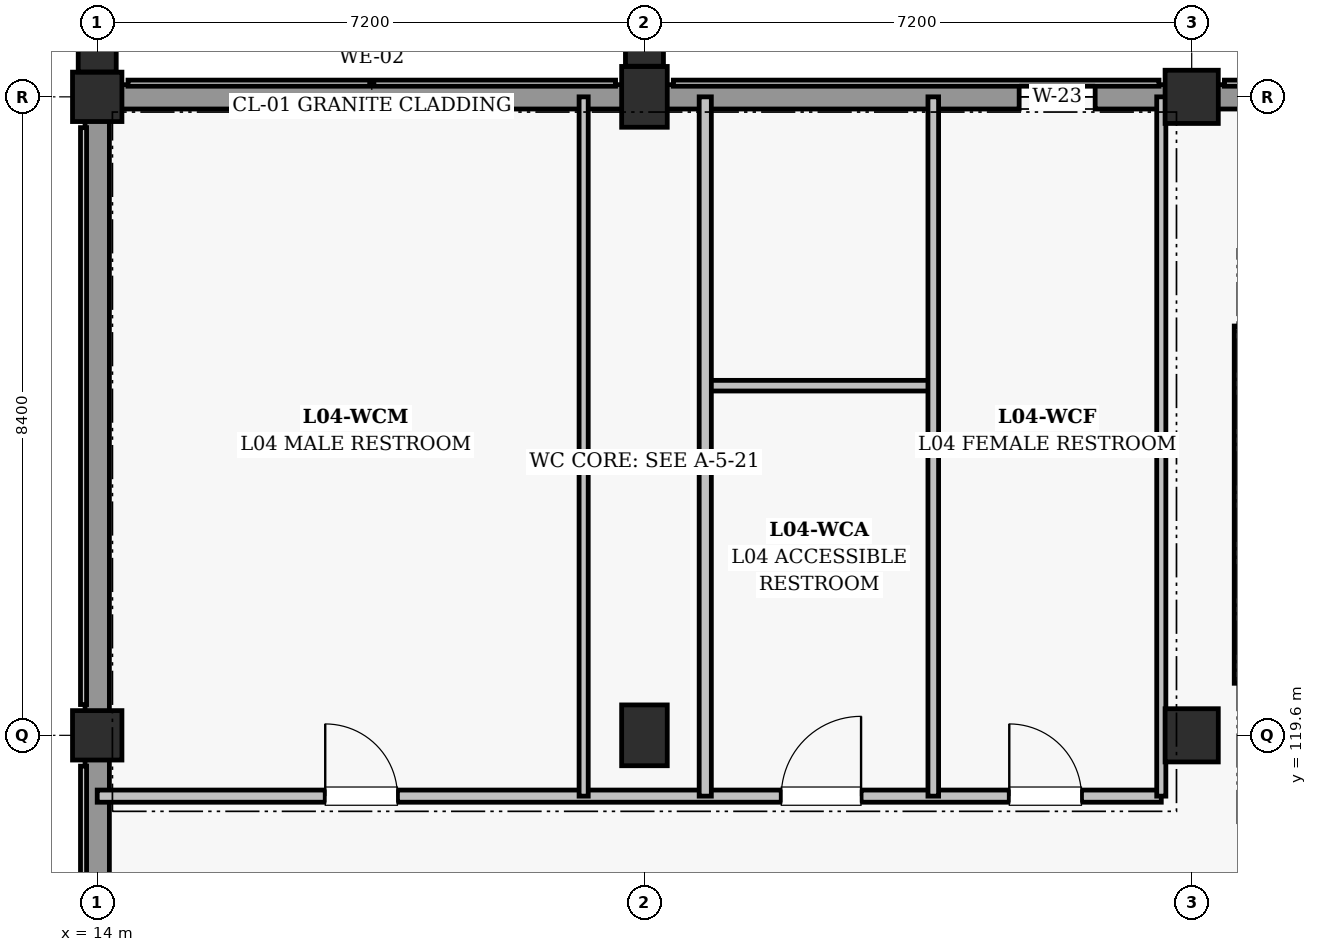
"""IFC4 building model, lengths in metres.
Left out: names, types, materials, properties, quantities, classifications, styles, units other than length and angle.
Written with IfcOpenShell. Run it as: python <this file> out.ifc"""

import sys

from ifc_helpers import new_model, si_unit, direction, frame, frame_2d, origin, origin_2d, place, context, subcontext, project, spatial, rectangle, extrude, element, fill, save


model = new_model("IFC4")
c1 = context("Model", 3, precision=1e-05, world=origin(), true_north=direction((0.0, 1.0)))
c2 = subcontext(c1, "Body", "Model", "MODEL_VIEW")
j1 = project(units=[si_unit("LENGTHUNIT", "METRE"), si_unit("PLANEANGLEUNIT", "RADIAN")], contexts=[c1])
p1 = place(None, origin())
s1 = spatial("IfcSite", under=j1, at=p1, CompositionType="ELEMENT")
p2 = place(p1, origin())
s2 = spatial("IfcBuilding", under=s1, at=p2, CompositionType="ELEMENT")
p3 = place(p2, frame((0.0, 0.0, 18.9)))
s3 = spatial("IfcBuildingStorey", under=s2, at=p3, CompositionType="ELEMENT", Elevation=18.9)
for number, where, z_axis, x_axis in (
    (1, (14.0, 119.6, 0.0), (0.0, 0.0, 1.0), (1.0, 0.0, 0.0)),
    (2, (14.0, 128.0, 0.0), (0.0, 0.0, 1.0), (1.0, 0.0, 0.0)),
):
    element("IfcColumn", number, at=place(p3, frame(where, z_axis=z_axis, x_axis=x_axis)), inside=s3, PredefinedType="COLUMN", context=c2, shape_type="SweptSolid", body=[
        extrude(rectangle(XDim=0.65, YDim=0.65, at=origin_2d()), origin(), (0.0, 0.0, 1.0), 4.5),
    ])
for number, where, z_axis, x_axis in (
    (3, (21.2, 119.6, 0.0), (0.0, 0.0, 1.0), (1.0, 0.0, 0.0)),
    (4, (21.2, 128.0, 0.0), (0.0, 0.0, 1.0), (1.0, 0.0, 0.0)),
):
    element("IfcColumn", number, at=place(p3, frame(where, z_axis=z_axis, x_axis=x_axis)), inside=s3, PredefinedType="COLUMN", context=c2, shape_type="SweptSolid", body=[
        extrude(rectangle(XDim=0.6, YDim=0.8, at=origin_2d()), origin(), (0.0, 0.0, 1.0), 4.5),
    ])
for number, where, z_axis, x_axis in (
    (5, (28.4, 119.6, 0.0), (0.0, 0.0, 1.0), (1.0, 0.0, 0.0)),
    (6, (28.4, 128.0, 0.0), (0.0, 0.0, 1.0), (1.0, 0.0, 0.0)),
):
    element("IfcColumn", number, at=place(p3, frame(where, z_axis=z_axis, x_axis=x_axis)), inside=s3, PredefinedType="COLUMN", context=c2, shape_type="SweptSolid", body=[
        extrude(rectangle(XDim=0.7, YDim=0.7, at=origin_2d()), origin(), (0.0, 0.0, 1.0), 4.5),
    ])
for number, where, z_axis, x_axis in (
    (7, (14.0, 128.703, 0.0), (0.0, 0.0, 1.0), (1.0, 0.0, 0.0)),
    (8, (21.2, 128.778, 0.0), (0.0, 0.0, 1.0), (1.0, 0.0, 0.0)),
):
    element("IfcColumn", number, at=place(p3, frame(where, z_axis=z_axis, x_axis=x_axis)), inside=s3, PredefinedType="PILASTER", context=c2, shape_type="SweptSolid", body=[
        extrude(rectangle(XDim=0.5, YDim=0.75, at=origin_2d()), origin(), (0.0, 0.0, 1.0), 4.5),
    ])
p4 = place(p3, frame((14.305, 128.0, 0.0), z_axis=(0.0, 0.0, 1.0), x_axis=(1.0, 0.0, 0.0)))
e9 = element("IfcWall", 9, at=p4, inside=s3, PredefinedType="SOLIDWALL", context=c2, shape_type="SweptSolid", body=[
    extrude(rectangle(XDim=6.615, YDim=0.32, at=frame_2d((3.308, 0.0))), origin(), (0.0, 0.0, 1.0), 3.305),
])
p5 = place(p3, frame((21.48, 128.0, 0.0), z_axis=(0.0, 0.0, 1.0), x_axis=(1.0, 0.0, 0.0)))
e10 = element("IfcWall", 10, at=p5, inside=s3, PredefinedType="SOLIDWALL", context=c2, shape_type="SweptSolid", body=[
    extrude(rectangle(XDim=6.59, YDim=0.32, at=frame_2d((3.295, 0.0))), origin(), (0.0, 0.0, 1.0), 3.305),
])
p6 = place(p5, frame((4.65, 0.0, 1.85)))
e11 = element("IfcOpeningElement", 11, at=p6, cuts=e10, PredefinedType="OPENING", context=c2, shape_type="SweptSolid", body=[
    extrude(rectangle(XDim=1.0, YDim=0.95, at=frame_2d((0.5, 0.475))), frame((0.0, 0.17, 0.0), z_axis=(0.0, -1.0, 0.0), x_axis=(1.0, 0.0, 0.0)), (0.0, 0.0, 1.0), 0.34),
])
p7 = place(p3, frame((28.73, 128.0, 0.0), z_axis=(0.0, 0.0, 1.0), x_axis=(1.0, 0.0, 0.0)))
e12 = element("IfcWall", 12, at=p7, inside=s3, PredefinedType="SOLIDWALL", context=c2, shape_type="SweptSolid", body=[
    extrude(rectangle(XDim=6.565, YDim=0.32, at=frame_2d((3.282, 0.0))), origin(), (0.0, 0.0, 1.0), 3.355),
])
p8 = place(p3, frame((14.0, 111.58, 0.0), z_axis=(0.0, 0.0, 1.0), x_axis=(0.0, 1.0, 0.0)))
e13 = element("IfcWall", 13, at=p8, inside=s3, PredefinedType="SOLIDWALL", context=c2, shape_type="SweptSolid", body=[
    extrude(rectangle(XDim=7.715, YDim=0.32, at=frame_2d((3.857, 0.0))), origin(), (0.0, 0.0, 1.0), 3.405),
])
p9 = place(p3, frame((14.0, 119.905, 0.0), z_axis=(0.0, 0.0, 1.0), x_axis=(0.0, 1.0, 0.0)))
e14 = element("IfcWall", 14, at=p9, inside=s3, PredefinedType="SOLIDWALL", context=c2, shape_type="SweptSolid", body=[
    extrude(rectangle(XDim=7.79, YDim=0.32, at=frame_2d((3.895, 0.0))), origin(), (0.0, 0.0, 1.0), 3.405),
])
p10 = place(p3, frame((29.085, 124.985, 0.0), z_axis=(0.0, 0.0, 1.0), x_axis=(0.0, -1.0, 0.0)))
e15 = element("IfcWall", 15, at=p10, inside=s3, PredefinedType="SHEAR", context=c2, shape_type="SweptSolid", body=[
    extrude(rectangle(XDim=4.7, YDim=0.25, at=frame_2d((2.35, 0.0))), origin(), (0.0, 0.0, 1.0), 4.175),
])
p11 = place(p3, frame((14.0, 118.8, 0.0), z_axis=(0.0, 0.0, 1.0), x_axis=(1.0, 0.0, 0.0)))
e16 = element("IfcWall", 16, at=p11, inside=s3, PredefinedType="PARTITIONING", context=c2, shape_type="SweptSolid", body=[
    extrude(rectangle(XDim=14.0, YDim=0.16, at=frame_2d((7.0, 0.0))), origin(), (0.0, 0.0, 1.0), 3.36),
])
p12 = place(p11, frame((3.0, 0.0, 0.0)))
e17 = element("IfcOpeningElement", 17, at=p12, cuts=e16, PredefinedType="OPENING", context=c2, shape_type="SweptSolid", body=[
    extrude(rectangle(XDim=0.95, YDim=2.15, at=frame_2d((0.475, 1.075))), frame((0.0, 0.09, 0.0), z_axis=(0.0, -1.0, 0.0), x_axis=(1.0, 0.0, 0.0)), (0.0, 0.0, 1.0), 0.18),
])
p13 = place(p11, frame((9.0, 0.0, 0.0)))
e18 = element("IfcOpeningElement", 18, at=p13, cuts=e16, PredefinedType="OPENING", context=c2, shape_type="SweptSolid", body=[
    extrude(rectangle(XDim=1.05, YDim=2.15, at=frame_2d((0.525, 1.075))), frame((0.0, 0.09, 0.0), z_axis=(0.0, -1.0, 0.0), x_axis=(1.0, 0.0, 0.0)), (0.0, 0.0, 1.0), 0.18),
])
p14 = place(p11, frame((12.0, 0.0, 0.0)))
e19 = element("IfcOpeningElement", 19, at=p14, cuts=e16, PredefinedType="OPENING", context=c2, shape_type="SweptSolid", body=[
    extrude(rectangle(XDim=0.95, YDim=2.15, at=frame_2d((0.475, 1.075))), frame((0.0, 0.09, 0.0), z_axis=(0.0, -1.0, 0.0), x_axis=(1.0, 0.0, 0.0)), (0.0, 0.0, 1.0), 0.18),
])
p15 = place(p3, frame((22.0, 124.2, 0.0), z_axis=(0.0, 0.0, 1.0), x_axis=(1.0, 0.0, 0.0)))
e20 = element("IfcWall", 20, at=p15, inside=s3, PredefinedType="PARTITIONING", context=c2, shape_type="SweptSolid", body=[
    extrude(rectangle(XDim=3.0, YDim=0.14, at=frame_2d((1.5, 0.0))), origin(), (0.0, 0.0, 1.0), 3.56),
])
p16 = place(p3, frame((20.4, 118.8, 0.0), z_axis=(0.0, 0.0, 1.0), x_axis=(0.0, 1.0, 0.0)))
e21 = element("IfcWall", 21, at=p16, inside=s3, PredefinedType="PARTITIONING", context=c2, shape_type="SweptSolid", body=[
    extrude(rectangle(XDim=9.2, YDim=0.12, at=frame_2d((4.6, 0.0))), origin(), (0.0, 0.0, 1.0), 3.41),
])
p17 = place(p3, frame((22.0, 118.8, 0.0), z_axis=(0.0, 0.0, 1.0), x_axis=(0.0, 1.0, 0.0)))
e22 = element("IfcWall", 22, at=p17, inside=s3, PredefinedType="PARTITIONING", context=c2, shape_type="SweptSolid", body=[
    extrude(rectangle(XDim=9.2, YDim=0.16, at=frame_2d((4.6, 0.0))), origin(), (0.0, 0.0, 1.0), 3.36),
])
p18 = place(p3, frame((25.0, 118.8, 0.0), z_axis=(0.0, 0.0, 1.0), x_axis=(0.0, 1.0, 0.0)))
e23 = element("IfcWall", 23, at=p18, inside=s3, PredefinedType="PARTITIONING", context=c2, shape_type="SweptSolid", body=[
    extrude(rectangle(XDim=9.2, YDim=0.14, at=frame_2d((4.6, 0.0))), origin(), (0.0, 0.0, 1.0), 3.36),
])
p19 = place(p3, frame((28.0, 118.8, 0.0), z_axis=(0.0, 0.0, 1.0), x_axis=(0.0, 1.0, 0.0)))
e24 = element("IfcWall", 24, at=p19, inside=s3, PredefinedType="PARTITIONING", context=c2, shape_type="SweptSolid", body=[
    extrude(rectangle(XDim=9.2, YDim=0.12, at=frame_2d((4.6, 0.0))), origin(), (0.0, 0.0, 1.0), 3.36),
])
p20 = place(p6, origin())
e25 = element("IfcWindow", 25, at=p20, inside=s3, PartitioningType="SINGLE_PANEL", PredefinedType="WINDOW", context=c2, shape_type="SweptSolid", body=[
    extrude(rectangle(XDim=1.0, YDim=0.95, at=frame_2d((0.5, 0.475))), frame((0.0, 0.03, 0.0), z_axis=(0.0, -1.0, 0.0), x_axis=(1.0, 0.0, 0.0)), (0.0, 0.0, 1.0), 0.06),
])
fill(e11, e25)
p21 = place(p12, origin())
e26 = element("IfcDoor", 26, at=p21, inside=s3, OperationType="SINGLE_SWING_LEFT", PredefinedType="DOOR", context=c2, shape_type="SweptSolid", body=[
    extrude(rectangle(XDim=0.95, YDim=2.15, at=frame_2d((0.475, 1.075))), frame((0.0, 0.025, 0.0), z_axis=(0.0, -1.0, 0.0), x_axis=(1.0, 0.0, 0.0)), (0.0, 0.0, 1.0), 0.05),
])
fill(e17, e26)
p22 = place(p13, origin())
e27 = element("IfcDoor", 27, at=p22, inside=s3, OperationType="SINGLE_SWING_RIGHT", PredefinedType="DOOR", context=c2, shape_type="SweptSolid", body=[
    extrude(rectangle(XDim=1.05, YDim=2.15, at=frame_2d((0.525, 1.075))), frame((0.0, 0.025, 0.0), z_axis=(0.0, -1.0, 0.0), x_axis=(1.0, 0.0, 0.0)), (0.0, 0.0, 1.0), 0.05),
])
fill(e18, e27)
p23 = place(p14, origin())
e28 = element("IfcDoor", 28, at=p23, inside=s3, OperationType="SINGLE_SWING_LEFT", PredefinedType="DOOR", context=c2, shape_type="SweptSolid", body=[
    extrude(rectangle(XDim=0.95, YDim=2.15, at=frame_2d((0.475, 1.075))), frame((0.0, 0.025, 0.0), z_axis=(0.0, -1.0, 0.0), x_axis=(1.0, 0.0, 0.0)), (0.0, 0.0, 1.0), 0.05),
])
fill(e19, e28)
save(model, sys.argv[1])
